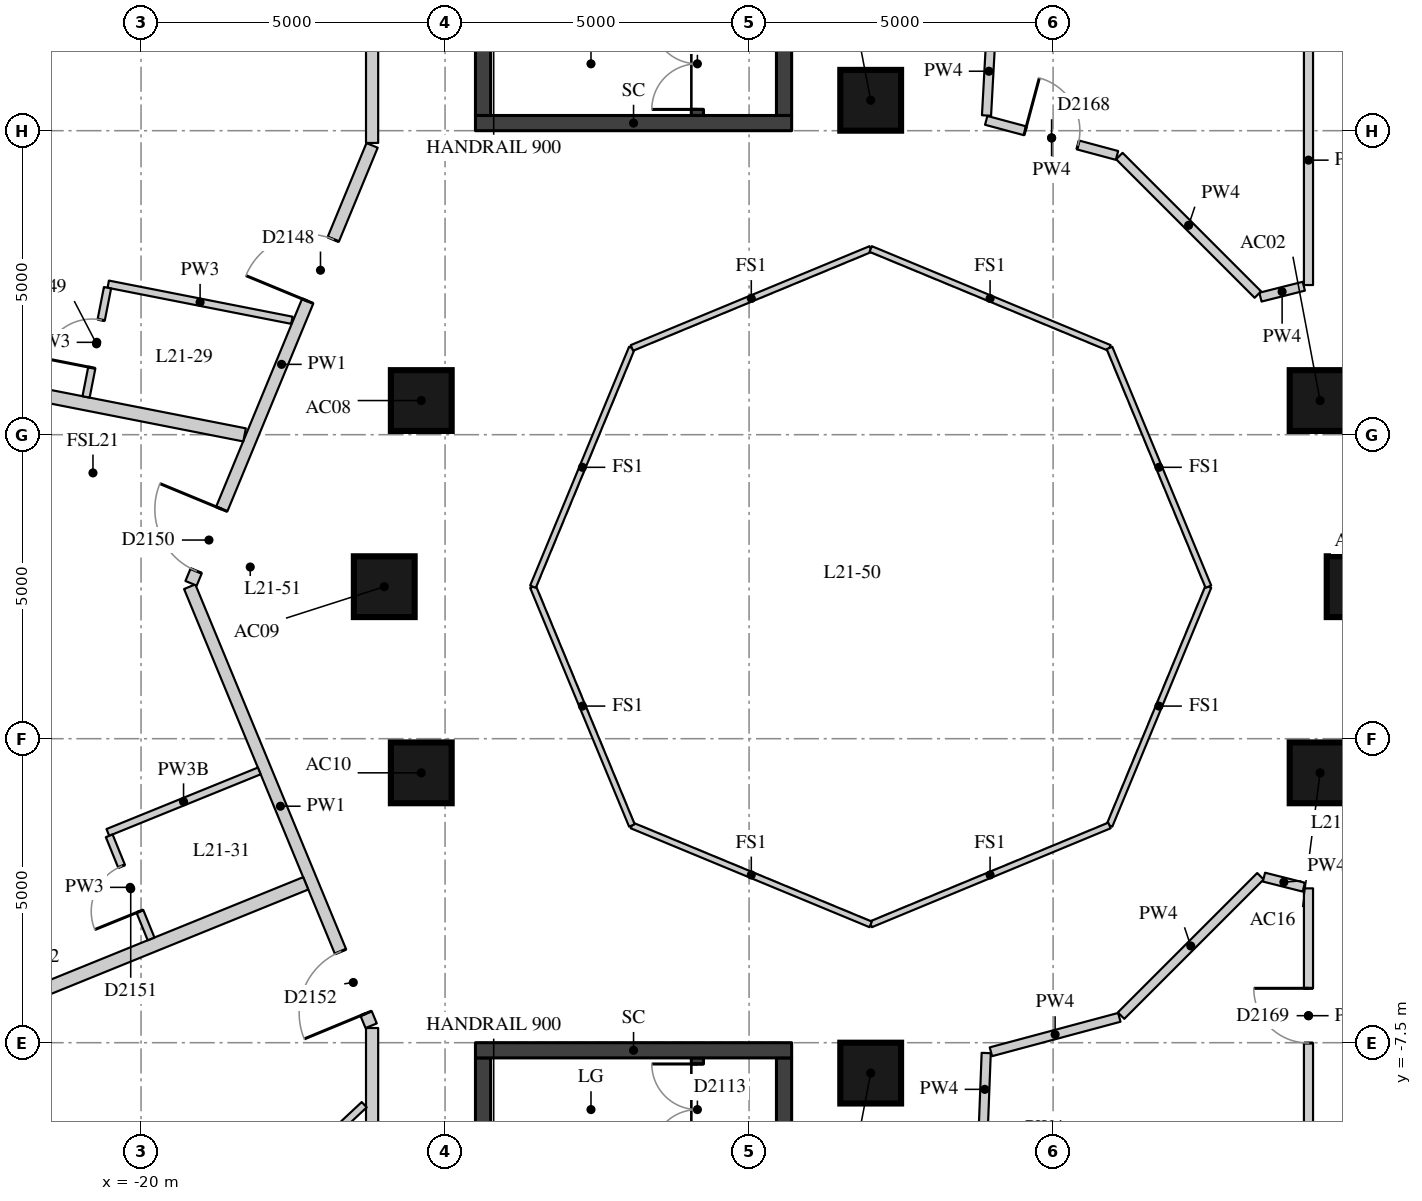
"""IFC4 building model, lengths in metres.
Left out: names, types, materials, properties, quantities, classifications, styles, units other than length and angle.
Written with IfcOpenShell. Run it as: python <this file> out.ifc"""

import sys

from ifc_helpers import new_model, si_unit, direction, frame, frame_2d, origin, origin_2d, place, context, subcontext, project, spatial, rectangle, extrude, element, fill, save


model = new_model("IFC4")
c1 = context("Model", 3, precision=1e-05, world=origin(), true_north=direction((0.0, 1.0)))
c2 = subcontext(c1, "Body", "Model", "MODEL_VIEW")
j1 = project(units=[si_unit("LENGTHUNIT", "METRE"), si_unit("PLANEANGLEUNIT", "RADIAN")], contexts=[c1])
p1 = place(None, origin())
s1 = spatial("IfcSite", under=j1, at=p1, CompositionType="ELEMENT")
p2 = place(p1, origin())
s2 = spatial("IfcBuilding", under=s1, at=p2, CompositionType="ELEMENT")
p3 = place(p2, frame((0.0, 0.0, 77.8)))
s3 = spatial("IfcBuildingStorey", under=s2, at=p3, CompositionType="ELEMENT", Elevation=77.8)
for number, where, z_axis, x_axis in (
    (1, (0.0, 0.0, 0.0), (0.0, 0.0, 1.0), (1.0, 0.0, 0.0)),
    (2, (-0.609, 3.062, 0.0), (0.0, 0.0, 1.0), (1.0, 0.0, 0.0)),
    (3, (-8.0, 8.0, 0.0), (0.0, 0.0, 1.0), (1.0, 0.0, 0.0)),
    (4, (-15.391, 3.062, 0.0), (0.0, 0.0, 1.0), (1.0, 0.0, 0.0)),
    (5, (-16.0, 0.0, 0.0), (0.0, 0.0, 1.0), (1.0, 0.0, 0.0)),
    (6, (-15.391, -3.062, 0.0), (0.0, 0.0, 1.0), (1.0, 0.0, 0.0)),
    (7, (-8.0, -8.0, 0.0), (0.0, 0.0, 1.0), (1.0, 0.0, 0.0)),
    (8, (-0.609, -3.062, 0.0), (0.0, 0.0, 1.0), (1.0, 0.0, 0.0)),
):
    element("IfcColumn", number, at=place(p3, frame(where, z_axis=z_axis, x_axis=x_axis)), inside=s3, PredefinedType="COLUMN", context=c2, shape_type="SweptSolid", body=[
        extrude(rectangle(XDim=1.0, YDim=1.0, at=origin_2d()), origin(), (0.0, 0.0, 1.0), 3.3),
    ])
p4 = place(p3, frame((-10.85, 7.75, 0.0), z_axis=(0.0, 0.0, 1.0), x_axis=(0.0, 1.0, 0.0)))
e9 = element("IfcWall", 9, at=p4, inside=s3, PredefinedType="SHEAR", context=c2, shape_type="SweptSolid", body=[
    extrude(rectangle(XDim=6.0, YDim=0.2, at=frame_2d((3.0, 0.0))), origin(), (0.0, 0.0, 1.0), 3.02),
])
p5 = place(p4, frame((0.1, 0.0, 0.0)))
e10 = element("IfcOpeningElement", 10, at=p5, cuts=e9, PredefinedType="OPENING", context=c2, shape_type="SweptSolid", body=[
    extrude(rectangle(XDim=1.5, YDim=2.1, at=frame_2d((0.75, 1.05))), frame((0.0, 0.11, 0.0), z_axis=(0.0, -1.0, 0.0), x_axis=(1.0, 0.0, 0.0)), (0.0, 0.0, 1.0), 0.22),
])
p6 = place(p3, frame((-10.85, -13.75, 0.0), z_axis=(0.0, 0.0, 1.0), x_axis=(0.0, 1.0, 0.0)))
e11 = element("IfcWall", 11, at=p6, inside=s3, PredefinedType="SHEAR", context=c2, shape_type="SweptSolid", body=[
    extrude(rectangle(XDim=6.0, YDim=0.2, at=frame_2d((3.0, 0.0))), origin(), (0.0, 0.0, 1.0), 3.02),
])
p7 = place(p6, frame((4.4, 0.0, 0.0)))
e12 = element("IfcOpeningElement", 12, at=p7, cuts=e11, PredefinedType="OPENING", context=c2, shape_type="SweptSolid", body=[
    extrude(rectangle(XDim=1.5, YDim=2.1, at=frame_2d((0.75, 1.05))), frame((0.0, 0.11, 0.0), z_axis=(0.0, -1.0, 0.0), x_axis=(1.0, 0.0, 0.0)), (0.0, 0.0, 1.0), 0.22),
])
p8 = place(p3, frame((-14.375, 7.75, -0.28), z_axis=(0.0, 0.0, 1.0), x_axis=(0.0, 1.0, 0.0)))
e13 = element("IfcWall", 13, at=p8, inside=s3, PredefinedType="SHEAR", context=c2, shape_type="SweptSolid", body=[
    extrude(rectangle(XDim=6.0, YDim=0.25, at=frame_2d((3.0, 0.0))), origin(), (0.0, 0.0, 1.0), 3.3),
])
p9 = place(p3, frame((-9.425, 7.75, -0.28), z_axis=(0.0, 0.0, 1.0), x_axis=(0.0, 1.0, 0.0)))
e14 = element("IfcWall", 14, at=p9, inside=s3, PredefinedType="SHEAR", context=c2, shape_type="SweptSolid", body=[
    extrude(rectangle(XDim=6.0, YDim=0.25, at=frame_2d((3.0, 0.0))), origin(), (0.0, 0.0, 1.0), 3.3),
])
p10 = place(p9, frame((2.1, 0.0, 0.28)))
e15 = element("IfcOpeningElement", 15, at=p10, cuts=e14, PredefinedType="OPENING", context=c2, shape_type="SweptSolid", body=[
    extrude(rectangle(XDim=1.5, YDim=2.1, at=frame_2d((0.75, 1.05))), frame((0.0, 0.135, 0.0), z_axis=(0.0, -1.0, 0.0), x_axis=(1.0, 0.0, 0.0)), (0.0, 0.0, 1.0), 0.27),
])
p11 = place(p3, frame((-14.5, 7.625, -0.28), z_axis=(0.0, 0.0, 1.0), x_axis=(1.0, 0.0, 0.0)))
e16 = element("IfcWall", 16, at=p11, inside=s3, PredefinedType="SHEAR", context=c2, shape_type="SweptSolid", body=[
    extrude(rectangle(XDim=5.2, YDim=0.25, at=frame_2d((2.6, 0.0))), origin(), (0.0, 0.0, 1.0), 3.3),
])
p12 = place(p3, frame((-14.375, -13.75, -0.28), z_axis=(0.0, 0.0, 1.0), x_axis=(0.0, 1.0, 0.0)))
e17 = element("IfcWall", 17, at=p12, inside=s3, PredefinedType="SHEAR", context=c2, shape_type="SweptSolid", body=[
    extrude(rectangle(XDim=6.0, YDim=0.25, at=frame_2d((3.0, 0.0))), origin(), (0.0, 0.0, 1.0), 3.3),
])
p13 = place(p3, frame((-9.425, -13.75, -0.28), z_axis=(0.0, 0.0, 1.0), x_axis=(0.0, 1.0, 0.0)))
e18 = element("IfcWall", 18, at=p13, inside=s3, PredefinedType="SHEAR", context=c2, shape_type="SweptSolid", body=[
    extrude(rectangle(XDim=6.0, YDim=0.25, at=frame_2d((3.0, 0.0))), origin(), (0.0, 0.0, 1.0), 3.3),
])
p14 = place(p13, frame((2.4, 0.0, 0.28)))
e19 = element("IfcOpeningElement", 19, at=p14, cuts=e18, PredefinedType="OPENING", context=c2, shape_type="SweptSolid", body=[
    extrude(rectangle(XDim=1.5, YDim=2.1, at=frame_2d((0.75, 1.05))), frame((0.0, 0.135, 0.0), z_axis=(0.0, -1.0, 0.0), x_axis=(1.0, 0.0, 0.0)), (0.0, 0.0, 1.0), 0.27),
])
p15 = place(p3, frame((-14.5, -7.625, -0.28), z_axis=(0.0, 0.0, 1.0), x_axis=(1.0, 0.0, 0.0)))
e20 = element("IfcWall", 20, at=p15, inside=s3, PredefinedType="SHEAR", context=c2, shape_type="SweptSolid", body=[
    extrude(rectangle(XDim=5.2, YDim=0.25, at=frame_2d((2.6, 0.0))), origin(), (0.0, 0.0, 1.0), 3.3),
])
p16 = place(p3, frame((-16.2, -14.974, 0.0), z_axis=(0.0, 0.0, 1.0), x_axis=(0.0, 1.0, 0.0)))
e21 = element("IfcWall", 21, at=p16, inside=s3, PredefinedType="PARTITIONING", context=c2, shape_type="SweptSolid", body=[
    extrude(rectangle(XDim=7.716, YDim=0.2, at=frame_2d((3.858, 0.0))), origin(), (0.0, 0.0, 1.0), 3.02),
])
p17 = place(p3, frame((-16.215, -7.221, 0.0), z_axis=(0.0, 0.0, 1.0), x_axis=(-0.382000362846, 0.924162173423, 0.0)))
e22 = element("IfcWall", 22, at=p17, inside=s3, PredefinedType="PARTITIONING", context=c2, shape_type="SweptSolid", body=[
    extrude(rectangle(XDim=7.814, YDim=0.2, at=frame_2d((3.907, 0.0))), origin(), (0.0, 0.0, 1.0), 3.02),
])
p18 = place(p17, frame((0.22, 0.0, 0.0)))
e23 = element("IfcOpeningElement", 23, at=p18, cuts=e22, PredefinedType="OPENING", context=c2, shape_type="SweptSolid", body=[
    extrude(rectangle(XDim=1.1, YDim=2.1, at=frame_2d((0.55, 1.05))), frame((0.0, 0.11, 0.0), z_axis=(0.0, -1.0, 0.0), x_axis=(1.0, 0.0, 0.0)), (0.0, 0.0, 1.0), 0.22),
])
p19 = place(p3, frame((-19.177, 0.056, 0.0), z_axis=(0.0, 0.0, 1.0), x_axis=(0.382011450526, 0.924157590277, 0.0)))
e24 = element("IfcWall", 24, at=p19, inside=s3, PredefinedType="PARTITIONING", context=c2, shape_type="SweptSolid", body=[
    extrude(rectangle(XDim=7.794, YDim=0.2, at=frame_2d((3.897, 0.0))), origin(), (0.0, 0.0, 1.0), 3.02),
])
p20 = place(p19, frame((5.022, 0.0, 0.0)))
e25 = element("IfcOpeningElement", 25, at=p20, cuts=e24, PredefinedType="OPENING", context=c2, shape_type="SweptSolid", body=[
    extrude(rectangle(XDim=1.1, YDim=2.1, at=frame_2d((0.55, 1.05))), frame((0.0, 0.11, 0.0), z_axis=(0.0, -1.0, 0.0), x_axis=(1.0, 0.0, 0.0)), (0.0, 0.0, 1.0), 0.22),
])
p21 = place(p19, frame((0.22, 0.0, 0.0)))
e26 = element("IfcOpeningElement", 26, at=p21, cuts=e24, PredefinedType="OPENING", context=c2, shape_type="SweptSolid", body=[
    extrude(rectangle(XDim=1.1, YDim=2.1, at=frame_2d((0.55, 1.05))), frame((0.0, 0.11, 0.0), z_axis=(0.0, -1.0, 0.0), x_axis=(1.0, 0.0, 0.0)), (0.0, 0.0, 1.0), 0.22),
])
p22 = place(p3, frame((-16.2, 7.298, 0.0), z_axis=(0.0, 0.0, 1.0), x_axis=(0.0, 1.0, 0.0)))
e27 = element("IfcWall", 27, at=p22, inside=s3, PredefinedType="PARTITIONING", context=c2, shape_type="SweptSolid", body=[
    extrude(rectangle(XDim=4.703, YDim=0.2, at=frame_2d((2.352, 0.0))), origin(), (0.0, 0.0, 1.0), 3.02),
])
p23 = place(p3, frame((-0.8, 9.07, 0.0), z_axis=(0.0, 0.0, 1.0), x_axis=(0.0, -1.0, 0.0)))
e28 = element("IfcWall", 28, at=p23, inside=s3, PredefinedType="PARTITIONING", context=c2, shape_type="SweptSolid", body=[
    extrude(rectangle(XDim=4.108, YDim=0.15, at=frame_2d((2.054, 0.0))), origin(), (0.0, 0.0, 1.0), 3.02),
])
p24 = place(p3, frame((-0.877, 4.942, 0.0), z_axis=(0.0, 0.0, 1.0), x_axis=(-0.969671869719, -0.244410443874, 0.0)))
e29 = element("IfcWall", 29, at=p24, inside=s3, PredefinedType="PARTITIONING", context=c2, shape_type="SweptSolid", body=[
    extrude(rectangle(XDim=0.735, YDim=0.15, at=frame_2d((0.368, 0.0))), origin(), (0.0, 0.0, 1.0), 3.02),
])
p25 = place(p3, frame((-1.633, 4.805, 0.0), z_axis=(0.0, 0.0, 1.0), x_axis=(-0.707068892009, 0.707144668334, 0.0)))
e30 = element("IfcWall", 30, at=p25, inside=s3, PredefinedType="PARTITIONING", context=c2, shape_type="SweptSolid", body=[
    extrude(rectangle(XDim=3.222, YDim=0.15, at=frame_2d((1.611, 0.0))), origin(), (0.0, 0.0, 1.0), 3.02),
])
p26 = place(p3, frame((-3.949, 7.093, 0.0), z_axis=(0.0, 0.0, 1.0), x_axis=(-0.965915749371, 0.258856649746, 0.0)))
e31 = element("IfcWall", 31, at=p26, inside=s3, PredefinedType="PARTITIONING", context=c2, shape_type="SweptSolid", body=[
    extrude(rectangle(XDim=2.227, YDim=0.15, at=frame_2d((1.113, 0.0))), origin(), (0.0, 0.0, 1.0), 3.02),
])
p27 = place(p26, frame((0.663, 0.0, 0.0)))
e32 = element("IfcOpeningElement", 32, at=p27, cuts=e31, PredefinedType="OPENING", context=c2, shape_type="SweptSolid", body=[
    extrude(rectangle(XDim=0.9, YDim=2.1, at=frame_2d((0.45, 1.05))), frame((0.0, 0.085, 0.0), z_axis=(0.0, -1.0, 0.0), x_axis=(1.0, 0.0, 0.0)), (0.0, 0.0, 1.0), 0.17),
])
p28 = place(p3, frame((-6.095, 7.75, 0.0), z_axis=(0.0, 0.0, 1.0), x_axis=(0.05473759482, 0.998500774017, 0.0)))
e33 = element("IfcWall", 33, at=p28, inside=s3, PredefinedType="PARTITIONING", context=c2, shape_type="SweptSolid", body=[
    extrude(rectangle(XDim=1.458, YDim=0.15, at=frame_2d((0.729, 0.0))), origin(), (0.0, 0.0, 1.0), 3.02),
])
p29 = place(p3, frame((-0.8, -4.961, 0.0), z_axis=(0.0, 0.0, 1.0), x_axis=(0.0, -1.0, 0.0)))
e34 = element("IfcWall", 34, at=p29, inside=s3, PredefinedType="PARTITIONING", context=c2, shape_type="SweptSolid", body=[
    extrude(rectangle(XDim=4.188, YDim=0.15, at=frame_2d((2.094, 0.0))), origin(), (0.0, 0.0, 1.0), 3.02),
])
p30 = place(p29, frame((1.644, 0.0, 0.0)))
e35 = element("IfcOpeningElement", 35, at=p30, cuts=e34, PredefinedType="OPENING", context=c2, shape_type="SweptSolid", body=[
    extrude(rectangle(XDim=0.9, YDim=2.1, at=frame_2d((0.45, 1.05))), frame((0.0, 0.085, 0.0), z_axis=(0.0, -1.0, 0.0), x_axis=(1.0, 0.0, 0.0)), (0.0, 0.0, 1.0), 0.17),
])
p31 = place(p3, frame((-6.146, -8.865, 0.0), z_axis=(0.0, 0.0, 1.0), x_axis=(0.038582079081, 0.999255434398, 0.0)))
e36 = element("IfcWall", 36, at=p31, inside=s3, PredefinedType="PARTITIONING", context=c2, shape_type="SweptSolid", body=[
    extrude(rectangle(XDim=1.196, YDim=0.15, at=frame_2d((0.598, 0.0))), origin(), (0.0, 0.0, 1.0), 3.02),
])
p32 = place(p3, frame((-6.023, -7.649, 0.0), z_axis=(0.0, 0.0, 1.0), x_axis=(0.965906186456, 0.258892330836, 0.0)))
e37 = element("IfcWall", 37, at=p32, inside=s3, PredefinedType="PARTITIONING", context=c2, shape_type="SweptSolid", body=[
    extrude(rectangle(XDim=2.187, YDim=0.15, at=frame_2d((1.093, 0.0))), origin(), (0.0, 0.0, 1.0), 3.02),
])
p33 = place(p3, frame((-3.882, -7.055, 0.0), z_axis=(0.0, 0.0, 1.0), x_axis=(0.707069126061, 0.707144434307, 0.0)))
e38 = element("IfcWall", 38, at=p33, inside=s3, PredefinedType="PARTITIONING", context=c2, shape_type="SweptSolid", body=[
    extrude(rectangle(XDim=3.242, YDim=0.15, at=frame_2d((1.621, 0.0))), origin(), (0.0, 0.0, 1.0), 3.02),
])
p34 = place(p3, frame((-1.532, -4.777, 0.0), z_axis=(0.0, 0.0, 1.0), x_axis=(0.969694394352, -0.244321062461, 0.0)))
e39 = element("IfcWall", 39, at=p34, inside=s3, PredefinedType="PARTITIONING", context=c2, shape_type="SweptSolid", body=[
    extrude(rectangle(XDim=0.676, YDim=0.15, at=frame_2d((0.338, 0.0))), origin(), (0.0, 0.0, 1.0), 3.02),
])
p35 = place(p3, frame((-25.761, 3.964, 0.0), z_axis=(0.0, 0.0, 1.0), x_axis=(0.981212489184, -0.192930171486, 0.0)))
e40 = element("IfcWall", 40, at=p35, inside=s3, PredefinedType="PARTITIONING", context=c2, shape_type="SweptSolid", body=[
    extrude(rectangle(XDim=7.606, YDim=0.22, at=frame_2d((3.803, 0.0))), origin(), (0.0, 0.0, 1.0), 2.47),
])
p36 = place(p3, frame((-25.851, -8.354, 0.0), z_axis=(0.0, 0.0, 1.0), x_axis=(0.926554383207, 0.376160836558, 0.0)))
e41 = element("IfcWall", 41, at=p36, inside=s3, PredefinedType="PARTITIONING", context=c2, shape_type="SweptSolid", body=[
    extrude(rectangle(XDim=9.238, YDim=0.22, at=frame_2d((4.619, 0.0))), origin(), (0.0, 0.0, 1.0), 3.02),
])
p37 = place(p3, frame((-17.518, 4.382, 0.0), z_axis=(0.0, 0.0, 1.0), x_axis=(-0.981212916867, 0.192927996342, 0.0)))
e42 = element("IfcWall", 42, at=p37, inside=s3, PredefinedType="PARTITIONING", context=c2, shape_type="SweptSolid", body=[
    extrude(rectangle(XDim=3.079, YDim=0.12, at=frame_2d((1.54, 0.0))), origin(), (0.0, 0.0, 1.0), 3.02),
])
p38 = place(p3, frame((-18.056, -3.031, 0.0), z_axis=(0.0, 0.0, 1.0), x_axis=(-0.926540804766, -0.376194281061, 0.0)))
e43 = element("IfcWall", 43, at=p38, inside=s3, PredefinedType="PARTITIONING", context=c2, shape_type="SweptSolid", body=[
    extrude(rectangle(XDim=2.688, YDim=0.12, at=frame_2d((1.344, 0.0))), origin(), (0.0, 0.0, 1.0), 2.47),
])
p39 = place(p3, frame((-16.329, -8.52, 0.0), z_axis=(0.0, 0.0, 1.0), x_axis=(-0.730102689118, -0.68333744471, 0.0)))
e44 = element("IfcWall", 44, at=p39, inside=s3, PredefinedType="PARTITIONING", context=c2, shape_type="SweptSolid", body=[
    extrude(rectangle(XDim=4.495, YDim=0.12, at=frame_2d((2.248, 0.0))), origin(), (0.0, 0.0, 1.0), 3.02),
])
p40 = place(p3, frame((-20.551, 4.917, 0.0), z_axis=(0.0, 0.0, 1.0), x_axis=(-0.19288291118, -0.981221780524, 0.0)))
e45 = element("IfcWall", 45, at=p40, inside=s3, PredefinedType="PARTITIONING", context=c2, shape_type="SweptSolid", body=[
    extrude(rectangle(XDim=1.83, YDim=0.12, at=frame_2d((0.915, 0.0))), origin(), (0.0, 0.0, 1.0), 3.02),
])
p41 = place(p40, frame((0.54, 0.0, 0.0)))
e46 = element("IfcOpeningElement", 46, at=p41, cuts=e45, PredefinedType="OPENING", context=c2, shape_type="SweptSolid", body=[
    extrude(rectangle(XDim=0.8, YDim=2.1, at=frame_2d((0.4, 1.05))), frame((0.0, 0.07, 0.0), z_axis=(0.0, -1.0, 0.0), x_axis=(1.0, 0.0, 0.0)), (0.0, 0.0, 1.0), 0.14),
])
p42 = place(p3, frame((-20.523, -4.097, 0.0), z_axis=(0.0, 0.0, 1.0), x_axis=(0.376216010002, -0.92653198208, 0.0)))
e47 = element("IfcWall", 47, at=p42, inside=s3, PredefinedType="PARTITIONING", context=c2, shape_type="SweptSolid", body=[
    extrude(rectangle(XDim=1.83, YDim=0.12, at=frame_2d((0.915, 0.0))), origin(), (0.0, 0.0, 1.0), 3.02),
])
p43 = place(p42, frame((0.54, 0.0, 0.0)))
e48 = element("IfcOpeningElement", 48, at=p43, cuts=e47, PredefinedType="OPENING", context=c2, shape_type="SweptSolid", body=[
    extrude(rectangle(XDim=0.8, YDim=2.1, at=frame_2d((0.4, 1.05))), frame((0.0, 0.07, 0.0), z_axis=(0.0, -1.0, 0.0), x_axis=(1.0, 0.0, 0.0)), (0.0, 0.0, 1.0), 0.14),
])
for number, where, z_axis, x_axis in (
    (49, (-2.446, 0.0, 0.0), (0.0, 0.0, 1.0), (-0.383, -0.924, 0.0)),
    (50, (-4.073, -3.927, 0.0), (0.0, 0.0, 1.0), (-0.924, -0.383, 0.0)),
    (51, (-8.0, -5.554, 0.0), (0.0, 0.0, 1.0), (-0.924, 0.383, 0.0)),
    (52, (-11.927, -3.927, 0.0), (0.0, 0.0, 1.0), (-0.383, 0.924, 0.0)),
    (53, (-13.554, 0.0, 0.0), (0.0, 0.0, 1.0), (0.383, 0.924, 0.0)),
    (54, (-11.927, 3.927, 0.0), (0.0, 0.0, 1.0), (0.924, 0.383, 0.0)),
    (55, (-8.0, 5.554, 0.0), (0.0, 0.0, 1.0), (0.924, -0.383, 0.0)),
    (56, (-4.073, 3.927, 0.0), (0.0, 0.0, 1.0), (0.383, -0.924, 0.0)),
):
    element("IfcWall", number, at=place(p3, frame(where, z_axis=z_axis, x_axis=x_axis)), inside=s3, PredefinedType="PARTITIONING", context=c2, shape_type="SweptSolid", body=[
        extrude(rectangle(XDim=4.251, YDim=0.1, at=frame_2d((2.125, 0.0))), origin(), (0.0, 0.0, 1.0), 3.02),
    ])
p44 = place(p5, origin())
e57 = element("IfcDoor", 57, at=p44, inside=s3, OperationType="DOUBLE_DOOR_SINGLE_SWING", PredefinedType="DOOR", context=c2, shape_type="SweptSolid", body=[
    extrude(rectangle(XDim=1.5, YDim=2.1, at=frame_2d((0.75, 1.05))), frame((0.0, 0.025, 0.0), z_axis=(0.0, -1.0, 0.0), x_axis=(1.0, 0.0, 0.0)), (0.0, 0.0, 1.0), 0.05),
])
fill(e10, e57)
p45 = place(p7, origin())
e58 = element("IfcDoor", 58, at=p45, inside=s3, OperationType="DOUBLE_DOOR_SINGLE_SWING", PredefinedType="DOOR", context=c2, shape_type="SweptSolid", body=[
    extrude(rectangle(XDim=1.5, YDim=2.1, at=frame_2d((0.75, 1.05))), frame((0.0, 0.025, 0.0), z_axis=(0.0, -1.0, 0.0), x_axis=(1.0, 0.0, 0.0)), (0.0, 0.0, 1.0), 0.05),
])
fill(e12, e58)
p46 = place(p20, origin())
e59 = element("IfcDoor", 59, at=p46, inside=s3, OperationType="SINGLE_SWING_LEFT", PredefinedType="DOOR", context=c2, shape_type="SweptSolid", body=[
    extrude(rectangle(XDim=1.1, YDim=2.1, at=frame_2d((0.55, 1.05))), frame((0.0, 0.025, 0.0), z_axis=(0.0, -1.0, 0.0), x_axis=(1.0, 0.0, 0.0)), (0.0, 0.0, 1.0), 0.05),
])
fill(e25, e59)
p47 = place(p41, origin())
e60 = element("IfcDoor", 60, at=p47, inside=s3, OperationType="SINGLE_SWING_LEFT", PredefinedType="DOOR", context=c2, shape_type="SweptSolid", body=[
    extrude(rectangle(XDim=0.8, YDim=2.1, at=frame_2d((0.4, 1.05))), frame((0.0, 0.025, 0.0), z_axis=(0.0, -1.0, 0.0), x_axis=(1.0, 0.0, 0.0)), (0.0, 0.0, 1.0), 0.05),
])
fill(e46, e60)
p48 = place(p21, origin())
e61 = element("IfcDoor", 61, at=p48, inside=s3, OperationType="SINGLE_SWING_RIGHT", PredefinedType="DOOR", context=c2, shape_type="SweptSolid", body=[
    extrude(rectangle(XDim=1.1, YDim=2.1, at=frame_2d((0.55, 1.05))), frame((0.0, 0.025, 0.0), z_axis=(0.0, -1.0, 0.0), x_axis=(1.0, 0.0, 0.0)), (0.0, 0.0, 1.0), 0.05),
])
fill(e26, e61)
p49 = place(p43, origin())
e62 = element("IfcDoor", 62, at=p49, inside=s3, OperationType="SINGLE_SWING_LEFT", PredefinedType="DOOR", context=c2, shape_type="SweptSolid", body=[
    extrude(rectangle(XDim=0.8, YDim=2.1, at=frame_2d((0.4, 1.05))), frame((0.0, 0.025, 0.0), z_axis=(0.0, -1.0, 0.0), x_axis=(1.0, 0.0, 0.0)), (0.0, 0.0, 1.0), 0.05),
])
fill(e48, e62)
p50 = place(p18, origin())
e63 = element("IfcDoor", 63, at=p50, inside=s3, OperationType="SINGLE_SWING_LEFT", PredefinedType="DOOR", context=c2, shape_type="SweptSolid", body=[
    extrude(rectangle(XDim=1.1, YDim=2.1, at=frame_2d((0.55, 1.05))), frame((0.0, 0.025, 0.0), z_axis=(0.0, -1.0, 0.0), x_axis=(1.0, 0.0, 0.0)), (0.0, 0.0, 1.0), 0.05),
])
fill(e23, e63)
p51 = place(p27, origin())
e64 = element("IfcDoor", 64, at=p51, inside=s3, OperationType="SINGLE_SWING_LEFT", PredefinedType="DOOR", context=c2, shape_type="SweptSolid", body=[
    extrude(rectangle(XDim=0.9, YDim=2.1, at=frame_2d((0.45, 1.05))), frame((0.0, 0.025, 0.0), z_axis=(0.0, -1.0, 0.0), x_axis=(1.0, 0.0, 0.0)), (0.0, 0.0, 1.0), 0.05),
])
fill(e32, e64)
p52 = place(p30, origin())
e65 = element("IfcDoor", 65, at=p52, inside=s3, OperationType="SINGLE_SWING_RIGHT", PredefinedType="DOOR", context=c2, shape_type="SweptSolid", body=[
    extrude(rectangle(XDim=0.9, YDim=2.1, at=frame_2d((0.45, 1.05))), frame((0.0, 0.025, 0.0), z_axis=(0.0, -1.0, 0.0), x_axis=(1.0, 0.0, 0.0)), (0.0, 0.0, 1.0), 0.05),
])
fill(e35, e65)
save(model, sys.argv[1])
